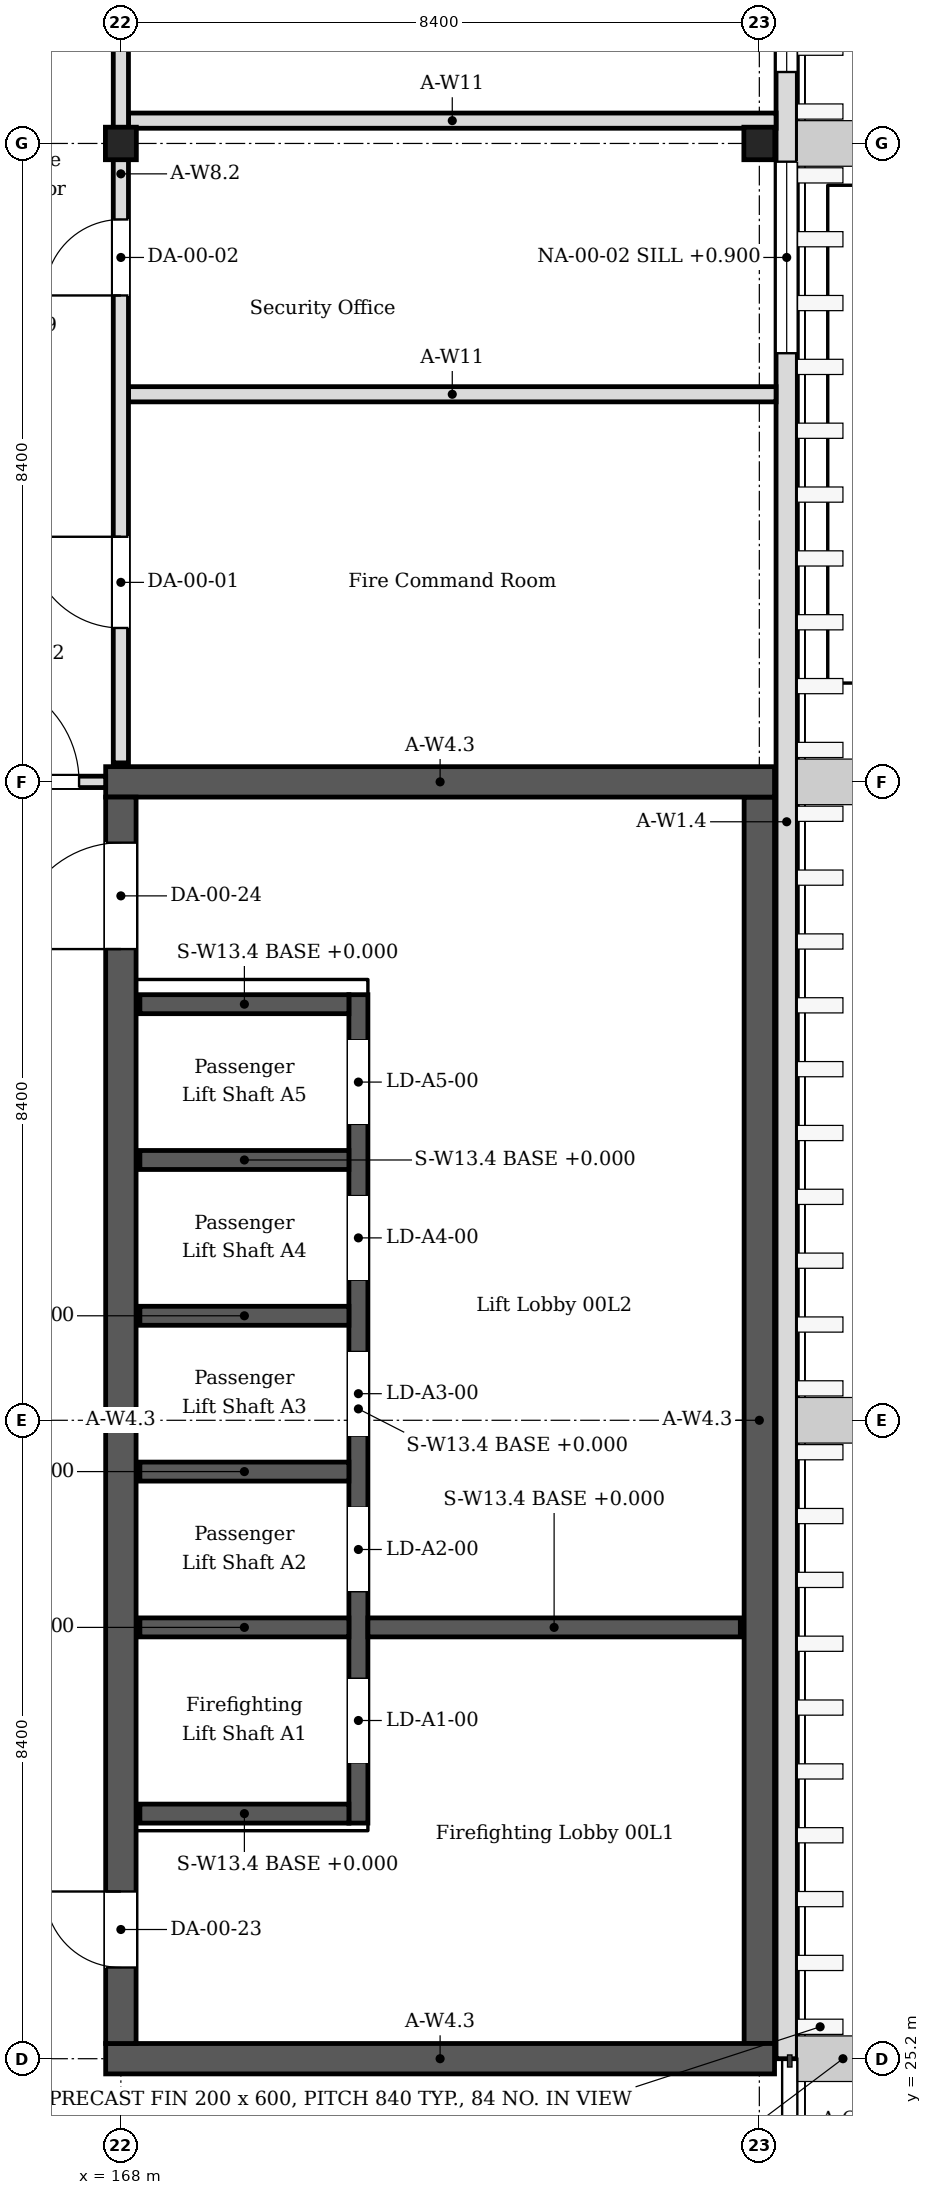
"""IFC4 building model, lengths in metres.
Left out: names, types, materials, properties, quantities, classifications, styles, units other than length and angle.
Written with IfcOpenShell. Run it as: python <this file> out.ifc"""

import sys

from ifc_helpers import new_model, si_unit, direction, frame, frame_2d, origin, origin_2d, place, context, subcontext, project, spatial, rectangle, i_section, extrude, element, fill, save


model = new_model("IFC4")
c1 = context("Model", 3, precision=1e-05, world=origin(), true_north=direction((0.0, 1.0)))
c2 = subcontext(c1, "Body", "Model", "MODEL_VIEW")
j1 = project(units=[si_unit("LENGTHUNIT", "METRE"), si_unit("PLANEANGLEUNIT", "RADIAN")], contexts=[c1])
p1 = place(None, origin())
s1 = spatial("IfcSite", under=j1, at=p1, CompositionType="ELEMENT")
p2 = place(p1, origin())
s2 = spatial("IfcBuilding", under=s1, at=p2, CompositionType="ELEMENT")
p3 = place(p2, origin())
s3 = spatial("IfcBuildingStorey", under=s2, at=p3, CompositionType="ELEMENT", Elevation=0.0)
for number, where, z_axis, x_axis in (
    (1, (168.0, 50.4, 0.0), (0.0, 0.0, 1.0), (1.0, 0.0, 0.0)),
    (2, (176.4, 50.4, 0.0), (0.0, 0.0, 1.0), (1.0, 0.0, 0.0)),
):
    element("IfcColumn", number, at=place(p3, frame(where, z_axis=z_axis, x_axis=x_axis)), inside=s3, PredefinedType="COLUMN", context=c2, shape_type="SweptSolid", body=[
        extrude(i_section(OverallWidth=0.407, OverallDepth=0.428, WebThickness=0.02, FlangeThickness=0.035, FilletRadius=0.022, at=origin_2d()), origin(), (0.0, 0.0, 1.0), 6.0),
    ])
for number, where, z_axis, x_axis in (
    (3, (167.8, 25.2, 0.0), (0.0, 0.0, 1.0), (1.0, 0.0, 0.0)),
    (4, (167.8, 42.0, 0.0), (0.0, 0.0, 1.0), (1.0, 0.0, 0.0)),
):
    element("IfcWall", number, at=place(p3, frame(where, z_axis=z_axis, x_axis=x_axis)), inside=s3, PredefinedType="SOLIDWALL", context=c2, shape_type="SweptSolid", body=[
        extrude(rectangle(XDim=8.8, YDim=0.4, at=frame_2d((4.4, 0.0))), origin(), (0.0, 0.0, 1.0), 5.85),
    ])
p4 = place(p3, frame((168.0, 25.4, 0.0), z_axis=(0.0, 0.0, 1.0), x_axis=(0.0, 1.0, 0.0)))
e5 = element("IfcWall", 5, at=p4, inside=s3, PredefinedType="SOLIDWALL", context=c2, shape_type="SweptSolid", body=[
    extrude(rectangle(XDim=16.4, YDim=0.4, at=frame_2d((8.2, 0.0))), origin(), (0.0, 0.0, 1.0), 5.85),
])
p5 = place(p4, frame((1.0, 0.0, 0.0)))
e6 = element("IfcOpeningElement", 6, at=p5, cuts=e5, PredefinedType="OPENING", context=c2, shape_type="SweptSolid", body=[
    extrude(rectangle(XDim=1.0, YDim=2.1, at=frame_2d((0.5, 1.05))), frame((0.0, 0.21, 0.0), z_axis=(0.0, -1.0, 0.0), x_axis=(1.0, 0.0, 0.0)), (0.0, 0.0, 1.0), 0.42),
])
p6 = place(p4, frame((14.4, 0.0, 0.0)))
e7 = element("IfcOpeningElement", 7, at=p6, cuts=e5, PredefinedType="OPENING", context=c2, shape_type="SweptSolid", body=[
    extrude(rectangle(XDim=1.4, YDim=2.1, at=frame_2d((0.7, 1.05))), frame((0.0, 0.21, 0.0), z_axis=(0.0, -1.0, 0.0), x_axis=(1.0, 0.0, 0.0)), (0.0, 0.0, 1.0), 0.42),
])
p7 = place(p3, frame((176.4, 25.4, 0.0), z_axis=(0.0, 0.0, 1.0), x_axis=(0.0, 1.0, 0.0)))
e8 = element("IfcWall", 8, at=p7, inside=s3, PredefinedType="SOLIDWALL", context=c2, shape_type="SweptSolid", body=[
    extrude(rectangle(XDim=16.4, YDim=0.4, at=frame_2d((8.2, 0.0))), origin(), (0.0, 0.0, 1.0), 5.85),
])
p8 = place(p3, frame((176.76, 25.2, 0.0), z_axis=(0.0, 0.0, 1.0), x_axis=(0.0, 1.0, 0.0)))
e9 = element("IfcWall", 9, at=p8, inside=s3, PredefinedType="SOLIDWALL", context=c2, shape_type="SweptSolid", body=[
    extrude(rectangle(XDim=42.22, YDim=0.28, at=frame_2d((21.11, 0.0))), origin(), (0.0, 0.0, 1.0), 5.85),
])
p9 = place(p8, frame((22.44, 0.0, 0.9)))
e10 = element("IfcOpeningElement", 10, at=p9, cuts=e9, PredefinedType="OPENING", context=c2, shape_type="SweptSolid", body=[
    extrude(rectangle(XDim=2.52, YDim=1.8, at=frame_2d((1.26, 0.9))), frame((0.0, 0.15, 0.0), z_axis=(0.0, -1.0, 0.0), x_axis=(1.0, 0.0, 0.0)), (0.0, 0.0, 1.0), 0.3),
])
p10 = place(p8, frame((26.14, 0.0, 0.9)))
e11 = element("IfcOpeningElement", 11, at=p10, cuts=e9, PredefinedType="OPENING", context=c2, shape_type="SweptSolid", body=[
    extrude(rectangle(XDim=2.52, YDim=1.8, at=frame_2d((1.26, 0.9))), frame((0.0, 0.15, 0.0), z_axis=(0.0, -1.0, 0.0), x_axis=(1.0, 0.0, 0.0)), (0.0, 0.0, 1.0), 0.3),
])
for number, where, z_axis, x_axis in (
    (12, (168.1, 47.1, 0.0), (0.0, 0.0, 1.0), (1.0, 0.0, 0.0)),
    (13, (168.1, 50.7, 0.0), (0.0, 0.0, 1.0), (1.0, 0.0, 0.0)),
):
    element("IfcWall", number, at=place(p3, frame(where, z_axis=z_axis, x_axis=x_axis)), inside=s3, PredefinedType="PARTITIONING", context=c2, shape_type="SweptSolid", body=[
        extrude(rectangle(XDim=8.52, YDim=0.2, at=frame_2d((4.26, 0.0))), origin(), (0.0, 0.0, 1.0), 5.25),
    ])
p11 = place(p3, frame((165.803, 42.0, 0.0), z_axis=(0.0, 0.0, 1.0), x_axis=(1.0, 0.0, 0.0)))
e14 = element("IfcWall", 14, at=p11, inside=s3, PredefinedType="PARTITIONING", context=c2, shape_type="SweptSolid", body=[
    extrude(rectangle(XDim=1.997, YDim=0.15, at=frame_2d((0.998, 0.0))), origin(), (0.0, 0.0, 1.0), 5.404),
])
p12 = place(p11, frame((0.247, 0.0, 0.0)))
e15 = element("IfcOpeningElement", 15, at=p12, cuts=e14, PredefinedType="OPENING", context=c2, shape_type="SweptSolid", body=[
    extrude(rectangle(XDim=1.4, YDim=2.1, at=frame_2d((0.7, 1.05))), frame((0.0, 0.085, 0.0), z_axis=(0.0, -1.0, 0.0), x_axis=(1.0, 0.0, 0.0)), (0.0, 0.0, 1.0), 0.17),
])
p13 = place(p3, frame((168.0, 42.25, 0.0), z_axis=(0.0, 0.0, 1.0), x_axis=(0.0, 1.0, 0.0)))
e16 = element("IfcWall", 16, at=p13, inside=s3, PredefinedType="PARTITIONING", context=c2, shape_type="SweptSolid", body=[
    extrude(rectangle(XDim=16.35, YDim=0.2, at=frame_2d((8.175, 0.0))), origin(), (0.0, 0.0, 1.0), 5.25),
])
p14 = place(p13, frame((1.775, 0.0, 0.0)))
e17 = element("IfcOpeningElement", 17, at=p14, cuts=e16, PredefinedType="OPENING", context=c2, shape_type="SweptSolid", body=[
    extrude(rectangle(XDim=1.2, YDim=2.1, at=frame_2d((0.6, 1.05))), frame((0.0, 0.11, 0.0), z_axis=(0.0, -1.0, 0.0), x_axis=(1.0, 0.0, 0.0)), (0.0, 0.0, 1.0), 0.22),
])
p15 = place(p13, frame((6.15, 0.0, 0.0)))
e18 = element("IfcOpeningElement", 18, at=p15, cuts=e16, PredefinedType="OPENING", context=c2, shape_type="SweptSolid", body=[
    extrude(rectangle(XDim=1.0, YDim=2.1, at=frame_2d((0.5, 1.05))), frame((0.0, 0.11, 0.0), z_axis=(0.0, -1.0, 0.0), x_axis=(1.0, 0.0, 0.0)), (0.0, 0.0, 1.0), 0.22),
])
p16 = place(p13, frame((9.85, 0.0, 0.0)))
e19 = element("IfcOpeningElement", 19, at=p16, cuts=e16, PredefinedType="OPENING", context=c2, shape_type="SweptSolid", body=[
    extrude(rectangle(XDim=1.0, YDim=2.1, at=frame_2d((0.5, 1.05))), frame((0.0, 0.11, 0.0), z_axis=(0.0, -1.0, 0.0), x_axis=(1.0, 0.0, 0.0)), (0.0, 0.0, 1.0), 0.22),
])
p17 = place(p13, frame((12.8, 0.0, 0.0)))
e20 = element("IfcOpeningElement", 20, at=p17, cuts=e16, PredefinedType="OPENING", context=c2, shape_type="SweptSolid", body=[
    extrude(rectangle(XDim=1.0, YDim=2.1, at=frame_2d((0.5, 1.05))), frame((0.0, 0.11, 0.0), z_axis=(0.0, -1.0, 0.0), x_axis=(1.0, 0.0, 0.0)), (0.0, 0.0, 1.0), 0.22),
])
p18 = place(p13, frame((14.9, 0.0, 0.0)))
e21 = element("IfcOpeningElement", 21, at=p18, cuts=e16, PredefinedType="OPENING", context=c2, shape_type="SweptSolid", body=[
    extrude(rectangle(XDim=1.0, YDim=2.1, at=frame_2d((0.5, 1.05))), frame((0.0, 0.11, 0.0), z_axis=(0.0, -1.0, 0.0), x_axis=(1.0, 0.0, 0.0)), (0.0, 0.0, 1.0), 0.22),
])
p19 = place(p3, frame((171.125, 28.3, 0.0), z_axis=(0.0, 0.0, 1.0), x_axis=(0.0, 1.0, 0.0)))
e22 = element("IfcWall", 22, at=p19, inside=s3, PredefinedType="SOLIDWALL", context=c2, shape_type="SweptSolid", body=[
    extrude(rectangle(XDim=10.9, YDim=0.25, at=frame_2d((5.45, 0.0))), origin(), (0.0, 0.0, 1.0), 5.85),
])
p20 = place(p19, frame((0.8, 0.0, 0.0)))
e23 = element("IfcOpeningElement", 23, at=p20, cuts=e22, PredefinedType="OPENING", context=c2, shape_type="SweptSolid", body=[
    extrude(rectangle(XDim=1.1, YDim=2.1, at=frame_2d((0.55, 1.05))), frame((0.0, 0.135, 0.0), z_axis=(0.0, -1.0, 0.0), x_axis=(1.0, 0.0, 0.0)), (0.0, 0.0, 1.0), 0.27),
])
p21 = place(p19, frame((3.05, 0.0, 0.0)))
e24 = element("IfcOpeningElement", 24, at=p21, cuts=e22, PredefinedType="OPENING", context=c2, shape_type="SweptSolid", body=[
    extrude(rectangle(XDim=1.1, YDim=2.1, at=frame_2d((0.55, 1.05))), frame((0.0, 0.135, 0.0), z_axis=(0.0, -1.0, 0.0), x_axis=(1.0, 0.0, 0.0)), (0.0, 0.0, 1.0), 0.27),
])
p22 = place(p19, frame((5.1, 0.0, 0.0)))
e25 = element("IfcOpeningElement", 25, at=p22, cuts=e22, PredefinedType="OPENING", context=c2, shape_type="SweptSolid", body=[
    extrude(rectangle(XDim=1.1, YDim=2.1, at=frame_2d((0.55, 1.05))), frame((0.0, 0.135, 0.0), z_axis=(0.0, -1.0, 0.0), x_axis=(1.0, 0.0, 0.0)), (0.0, 0.0, 1.0), 0.27),
])
p23 = place(p19, frame((7.15, 0.0, 0.0)))
e26 = element("IfcOpeningElement", 26, at=p23, cuts=e22, PredefinedType="OPENING", context=c2, shape_type="SweptSolid", body=[
    extrude(rectangle(XDim=1.1, YDim=2.1, at=frame_2d((0.55, 1.05))), frame((0.0, 0.135, 0.0), z_axis=(0.0, -1.0, 0.0), x_axis=(1.0, 0.0, 0.0)), (0.0, 0.0, 1.0), 0.27),
])
p24 = place(p19, frame((9.2, 0.0, 0.0)))
e27 = element("IfcOpeningElement", 27, at=p24, cuts=e22, PredefinedType="OPENING", context=c2, shape_type="SweptSolid", body=[
    extrude(rectangle(XDim=1.1, YDim=2.1, at=frame_2d((0.55, 1.05))), frame((0.0, 0.135, 0.0), z_axis=(0.0, -1.0, 0.0), x_axis=(1.0, 0.0, 0.0)), (0.0, 0.0, 1.0), 0.27),
])
for number, where, z_axis, x_axis in (
    (28, (168.25, 28.425, 0.0), (0.0, 0.0, 1.0), (1.0, 0.0, 0.0)),
    (29, (168.25, 30.875, 0.0), (0.0, 0.0, 1.0), (1.0, 0.0, 0.0)),
    (30, (168.25, 32.925, 0.0), (0.0, 0.0, 1.0), (1.0, 0.0, 0.0)),
    (31, (168.25, 34.975, 0.0), (0.0, 0.0, 1.0), (1.0, 0.0, 0.0)),
    (32, (168.25, 37.025, 0.0), (0.0, 0.0, 1.0), (1.0, 0.0, 0.0)),
    (33, (168.25, 39.075, 0.0), (0.0, 0.0, 1.0), (1.0, 0.0, 0.0)),
):
    element("IfcWall", number, at=place(p3, frame(where, z_axis=z_axis, x_axis=x_axis)), inside=s3, PredefinedType="SOLIDWALL", context=c2, shape_type="SweptSolid", body=[
        extrude(rectangle(XDim=2.75, YDim=0.25, at=frame_2d((1.375, 0.0))), origin(), (0.0, 0.0, 1.0), 5.85),
    ])
p25 = place(p3, frame((171.25, 30.875, 0.0), z_axis=(0.0, 0.0, 1.0), x_axis=(1.0, 0.0, 0.0)))
e34 = element("IfcWall", 34, at=p25, inside=s3, PredefinedType="SOLIDWALL", context=c2, shape_type="SweptSolid", body=[
    extrude(rectangle(XDim=4.9, YDim=0.25, at=frame_2d((2.45, 0.0))), origin(), (0.0, 0.0, 1.0), 5.85),
])
p26 = place(p9, origin())
e35 = element("IfcWindow", 35, at=p26, inside=s3, PartitioningType="SINGLE_PANEL", PredefinedType="WINDOW", context=c2, shape_type="SweptSolid", body=[
    extrude(rectangle(XDim=2.52, YDim=1.8, at=frame_2d((1.26, 0.9))), frame((0.0, 0.03, 0.0), z_axis=(0.0, -1.0, 0.0), x_axis=(1.0, 0.0, 0.0)), (0.0, 0.0, 1.0), 0.06),
])
fill(e10, e35)
p27 = place(p10, origin())
e36 = element("IfcWindow", 36, at=p27, inside=s3, PartitioningType="SINGLE_PANEL", PredefinedType="WINDOW", context=c2, shape_type="SweptSolid", body=[
    extrude(rectangle(XDim=2.52, YDim=1.8, at=frame_2d((1.26, 0.9))), frame((0.0, 0.03, 0.0), z_axis=(0.0, -1.0, 0.0), x_axis=(1.0, 0.0, 0.0)), (0.0, 0.0, 1.0), 0.06),
])
fill(e11, e36)
p28 = place(p14, origin())
e37 = element("IfcDoor", 37, at=p28, inside=s3, OperationType="SINGLE_SWING_RIGHT", PredefinedType="DOOR", context=c2, shape_type="SweptSolid", body=[
    extrude(rectangle(XDim=1.2, YDim=2.1, at=frame_2d((0.6, 1.05))), frame((0.0, 0.025, 0.0), z_axis=(0.0, -1.0, 0.0), x_axis=(1.0, 0.0, 0.0)), (0.0, 0.0, 1.0), 0.05),
])
fill(e17, e37)
p29 = place(p15, origin())
e38 = element("IfcDoor", 38, at=p29, inside=s3, OperationType="SINGLE_SWING_LEFT", PredefinedType="DOOR", context=c2, shape_type="SweptSolid", body=[
    extrude(rectangle(XDim=1.0, YDim=2.1, at=frame_2d((0.5, 1.05))), frame((0.0, 0.025, 0.0), z_axis=(0.0, -1.0, 0.0), x_axis=(1.0, 0.0, 0.0)), (0.0, 0.0, 1.0), 0.05),
])
fill(e18, e38)
p30 = place(p12, origin())
e39 = element("IfcDoor", 39, at=p30, inside=s3, OperationType="DOUBLE_DOOR_DOUBLE_SWING", PredefinedType="DOOR", context=c2, shape_type="SweptSolid", body=[
    extrude(rectangle(XDim=1.4, YDim=2.1, at=frame_2d((0.7, 1.05))), frame((0.0, 0.025, 0.0), z_axis=(0.0, -1.0, 0.0), x_axis=(1.0, 0.0, 0.0)), (0.0, 0.0, 1.0), 0.05),
])
fill(e15, e39)
p31 = place(p20, origin())
e40 = element("IfcDoor", 40, at=p31, inside=s3, OperationType="SLIDING_TO_LEFT", PredefinedType="DOOR", context=c2, shape_type="SweptSolid", body=[
    extrude(rectangle(XDim=1.1, YDim=2.1, at=frame_2d((0.55, 1.05))), frame((0.0, 0.025, 0.0), z_axis=(0.0, -1.0, 0.0), x_axis=(1.0, 0.0, 0.0)), (0.0, 0.0, 1.0), 0.05),
])
fill(e23, e40)
p32 = place(p21, origin())
e41 = element("IfcDoor", 41, at=p32, inside=s3, OperationType="SLIDING_TO_LEFT", PredefinedType="DOOR", context=c2, shape_type="SweptSolid", body=[
    extrude(rectangle(XDim=1.1, YDim=2.1, at=frame_2d((0.55, 1.05))), frame((0.0, 0.025, 0.0), z_axis=(0.0, -1.0, 0.0), x_axis=(1.0, 0.0, 0.0)), (0.0, 0.0, 1.0), 0.05),
])
fill(e24, e41)
p33 = place(p22, origin())
e42 = element("IfcDoor", 42, at=p33, inside=s3, OperationType="SLIDING_TO_LEFT", PredefinedType="DOOR", context=c2, shape_type="SweptSolid", body=[
    extrude(rectangle(XDim=1.1, YDim=2.1, at=frame_2d((0.55, 1.05))), frame((0.0, 0.025, 0.0), z_axis=(0.0, -1.0, 0.0), x_axis=(1.0, 0.0, 0.0)), (0.0, 0.0, 1.0), 0.05),
])
fill(e25, e42)
p34 = place(p23, origin())
e43 = element("IfcDoor", 43, at=p34, inside=s3, OperationType="SLIDING_TO_LEFT", PredefinedType="DOOR", context=c2, shape_type="SweptSolid", body=[
    extrude(rectangle(XDim=1.1, YDim=2.1, at=frame_2d((0.55, 1.05))), frame((0.0, 0.025, 0.0), z_axis=(0.0, -1.0, 0.0), x_axis=(1.0, 0.0, 0.0)), (0.0, 0.0, 1.0), 0.05),
])
fill(e26, e43)
p35 = place(p24, origin())
e44 = element("IfcDoor", 44, at=p35, inside=s3, OperationType="SLIDING_TO_LEFT", PredefinedType="DOOR", context=c2, shape_type="SweptSolid", body=[
    extrude(rectangle(XDim=1.1, YDim=2.1, at=frame_2d((0.55, 1.05))), frame((0.0, 0.025, 0.0), z_axis=(0.0, -1.0, 0.0), x_axis=(1.0, 0.0, 0.0)), (0.0, 0.0, 1.0), 0.05),
])
fill(e27, e44)
p36 = place(p5, origin())
e45 = element("IfcDoor", 45, at=p36, inside=s3, OperationType="SINGLE_SWING_RIGHT", PredefinedType="DOOR", context=c2, shape_type="SweptSolid", body=[
    extrude(rectangle(XDim=1.0, YDim=2.1, at=frame_2d((0.5, 1.05))), frame((0.0, 0.025, 0.0), z_axis=(0.0, -1.0, 0.0), x_axis=(1.0, 0.0, 0.0)), (0.0, 0.0, 1.0), 0.05),
])
fill(e6, e45)
p37 = place(p6, origin())
e46 = element("IfcDoor", 46, at=p37, inside=s3, OperationType="DOUBLE_DOOR_DOUBLE_SWING", PredefinedType="DOOR", context=c2, shape_type="SweptSolid", body=[
    extrude(rectangle(XDim=1.4, YDim=2.1, at=frame_2d((0.7, 1.05))), frame((0.0, 0.025, 0.0), z_axis=(0.0, -1.0, 0.0), x_axis=(1.0, 0.0, 0.0)), (0.0, 0.0, 1.0), 0.05),
])
fill(e7, e46)
save(model, sys.argv[1])
